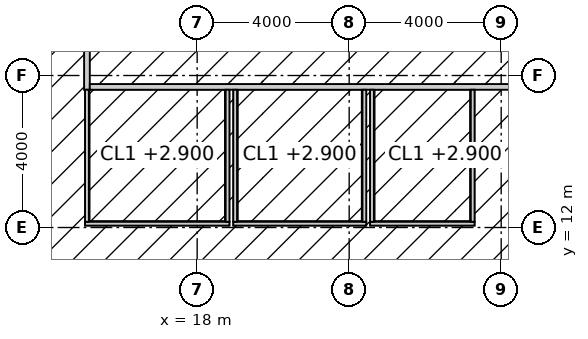
"""IFC4 building model, lengths in metres.
Left out: names, types, materials, properties, quantities, classifications, styles, units other than length and angle.
Written with IfcOpenShell. Run it as: python <this file> out.ifc"""

import sys

from ifc_helpers import new_model, si_unit, direction, frame, frame_2d, origin, place, context, subcontext, project, spatial, rectangle, extrude, element, fill, save


model = new_model("IFC4")
c1 = context("Model", 3, precision=1e-05, world=origin(), true_north=direction((0.0, 1.0)))
c2 = subcontext(c1, "Body", "Model", "MODEL_VIEW")
j1 = project(units=[si_unit("LENGTHUNIT", "METRE"), si_unit("PLANEANGLEUNIT", "RADIAN")], contexts=[c1])
p1 = place(None, origin())
s1 = spatial("IfcSite", under=j1, at=p1, CompositionType="ELEMENT")
p2 = place(p1, origin())
s2 = spatial("IfcBuilding", under=s1, at=p2, CompositionType="ELEMENT")
p3 = place(p2, frame((0.0, 0.0, 179.8)))
s3 = spatial("IfcBuildingStorey", under=s2, at=p3, CompositionType="ELEMENT", Elevation=179.8)
p4 = place(p3, frame((15.1, 15.625, 0.0), z_axis=(0.0, 0.0, 1.0), x_axis=(0.0, 1.0, 0.0)))
e1 = element("IfcWall", 1, at=p4, inside=s3, PredefinedType="PARTITIONING", context=c2, shape_type="SweptSolid", body=[
    extrude(rectangle(XDim=22.75, YDim=0.15, at=frame_2d((11.375, 0.0))), origin(), (0.0, 0.0, 1.0), 3.85),
])
p5 = place(p4, frame((2.974, 0.0, 0.0)))
e2 = element("IfcOpeningElement", 2, at=p5, cuts=e1, PredefinedType="OPENING", context=c2, shape_type="SweptSolid", body=[
    extrude(rectangle(XDim=1.8, YDim=2.4, at=frame_2d((0.9, 1.2))), frame((0.0, 0.085, 0.0), z_axis=(0.0, -1.0, 0.0), x_axis=(1.0, 0.0, 0.0)), (0.0, 0.0, 1.0), 0.17),
])
p6 = place(p4, frame((14.225, 0.0, 0.0)))
e3 = element("IfcOpeningElement", 3, at=p6, cuts=e1, PredefinedType="OPENING", context=c2, shape_type="SweptSolid", body=[
    extrude(rectangle(XDim=1.8, YDim=2.4, at=frame_2d((0.9, 1.2))), frame((0.0, 0.085, 0.0), z_axis=(0.0, -1.0, 0.0), x_axis=(1.0, 0.0, 0.0)), (0.0, 0.0, 1.0), 0.17),
])
p7 = place(p3, frame((15.175, 15.7, 0.0), z_axis=(0.0, 0.0, 1.0), x_axis=(1.0, 0.0, 0.0)))
e4 = element("IfcWall", 4, at=p7, inside=s3, PredefinedType="PARTITIONING", context=c2, shape_type="SweptSolid", body=[
    extrude(rectangle(XDim=22.65, YDim=0.15, at=frame_2d((11.325, 0.0))), origin(), (0.0, 0.0, 1.0), 3.85),
])
p8 = place(p3, frame((15.05, 12.1, 0.0), z_axis=(0.0, 0.0, 1.0), x_axis=(1.0, 0.0, 0.0)))
e5 = element("IfcWall", 5, at=p8, inside=s3, PredefinedType="PARTITIONING", context=c2, shape_type="SweptSolid", body=[
    extrude(rectangle(XDim=3.8, YDim=0.1, at=frame_2d((1.9, 0.0))), origin(), (0.0, 0.0, 1.0), 3.85),
])
p9 = place(p8, frame((1.4, 0.0, 0.0)))
e6 = element("IfcOpeningElement", 6, at=p9, cuts=e5, PredefinedType="OPENING", context=c2, shape_type="SweptSolid", body=[
    extrude(rectangle(XDim=1.0, YDim=2.2, at=frame_2d((0.5, 1.1))), frame((0.0, 0.06, 0.0), z_axis=(0.0, -1.0, 0.0), x_axis=(1.0, 0.0, 0.0)), (0.0, 0.0, 1.0), 0.12),
])
p10 = place(p3, frame((18.95, 12.1, 0.0), z_axis=(0.0, 0.0, 1.0), x_axis=(1.0, 0.0, 0.0)))
e7 = element("IfcWall", 7, at=p10, inside=s3, PredefinedType="PARTITIONING", context=c2, shape_type="SweptSolid", body=[
    extrude(rectangle(XDim=3.5, YDim=0.1, at=frame_2d((1.75, 0.0))), origin(), (0.0, 0.0, 1.0), 3.85),
])
p11 = place(p10, frame((1.25, 0.0, 0.0)))
e8 = element("IfcOpeningElement", 8, at=p11, cuts=e7, PredefinedType="OPENING", context=c2, shape_type="SweptSolid", body=[
    extrude(rectangle(XDim=1.0, YDim=2.2, at=frame_2d((0.5, 1.1))), frame((0.0, 0.06, 0.0), z_axis=(0.0, -1.0, 0.0), x_axis=(1.0, 0.0, 0.0)), (0.0, 0.0, 1.0), 0.12),
])
p12 = place(p3, frame((22.55, 12.1, 0.0), z_axis=(0.0, 0.0, 1.0), x_axis=(1.0, 0.0, 0.0)))
e9 = element("IfcWall", 9, at=p12, inside=s3, PredefinedType="PARTITIONING", context=c2, shape_type="SweptSolid", body=[
    extrude(rectangle(XDim=2.75, YDim=0.1, at=frame_2d((1.375, 0.0))), origin(), (0.0, 0.0, 1.0), 3.85),
])
p13 = place(p12, frame((0.875, 0.0, 0.0)))
e10 = element("IfcOpeningElement", 10, at=p13, cuts=e9, PredefinedType="OPENING", context=c2, shape_type="SweptSolid", body=[
    extrude(rectangle(XDim=1.0, YDim=2.2, at=frame_2d((0.5, 1.1))), frame((0.0, 0.06, 0.0), z_axis=(0.0, -1.0, 0.0), x_axis=(1.0, 0.0, 0.0)), (0.0, 0.0, 1.0), 0.12),
])
for number, where, z_axis, x_axis in (
    (11, (15.1, 12.15, 0.0), (0.0, 0.0, 1.0), (0.0, 1.0, 0.0)),
    (12, (18.8, 12.15, 0.0), (0.0, 0.0, 1.0), (0.0, 1.0, 0.0)),
    (13, (19.0, 12.15, 0.0), (0.0, 0.0, 1.0), (0.0, 1.0, 0.0)),
    (14, (22.4, 12.15, 0.0), (0.0, 0.0, 1.0), (0.0, 1.0, 0.0)),
    (15, (22.6, 12.15, 0.0), (0.0, 0.0, 1.0), (0.0, 1.0, 0.0)),
    (16, (25.25, 12.15, 0.0), (0.0, 0.0, 1.0), (0.0, 1.0, 0.0)),
):
    element("IfcWall", number, at=place(p3, frame(where, z_axis=z_axis, x_axis=x_axis)), inside=s3, PredefinedType="PARTITIONING", context=c2, shape_type="SweptSolid", body=[
        extrude(rectangle(XDim=3.475, YDim=0.1, at=frame_2d((1.738, 0.0))), origin(), (0.0, 0.0, 1.0), 3.85),
    ])
p14 = place(p9, origin())
e17 = element("IfcDoor", 17, at=p14, inside=s3, OperationType="SINGLE_SWING_RIGHT", PredefinedType="DOOR", context=c2, shape_type="SweptSolid", body=[
    extrude(rectangle(XDim=1.0, YDim=2.2, at=frame_2d((0.5, 1.1))), frame((0.0, 0.025, 0.0), z_axis=(0.0, -1.0, 0.0), x_axis=(1.0, 0.0, 0.0)), (0.0, 0.0, 1.0), 0.05),
])
fill(e6, e17)
p15 = place(p11, origin())
e18 = element("IfcDoor", 18, at=p15, inside=s3, OperationType="SINGLE_SWING_LEFT", PredefinedType="DOOR", context=c2, shape_type="SweptSolid", body=[
    extrude(rectangle(XDim=1.0, YDim=2.2, at=frame_2d((0.5, 1.1))), frame((0.0, 0.025, 0.0), z_axis=(0.0, -1.0, 0.0), x_axis=(1.0, 0.0, 0.0)), (0.0, 0.0, 1.0), 0.05),
])
fill(e8, e18)
p16 = place(p13, origin())
e19 = element("IfcDoor", 19, at=p16, inside=s3, OperationType="SINGLE_SWING_LEFT", PredefinedType="DOOR", context=c2, shape_type="SweptSolid", body=[
    extrude(rectangle(XDim=1.0, YDim=2.2, at=frame_2d((0.5, 1.1))), frame((0.0, 0.025, 0.0), z_axis=(0.0, -1.0, 0.0), x_axis=(1.0, 0.0, 0.0)), (0.0, 0.0, 1.0), 0.05),
])
fill(e10, e19)
save(model, sys.argv[1])
